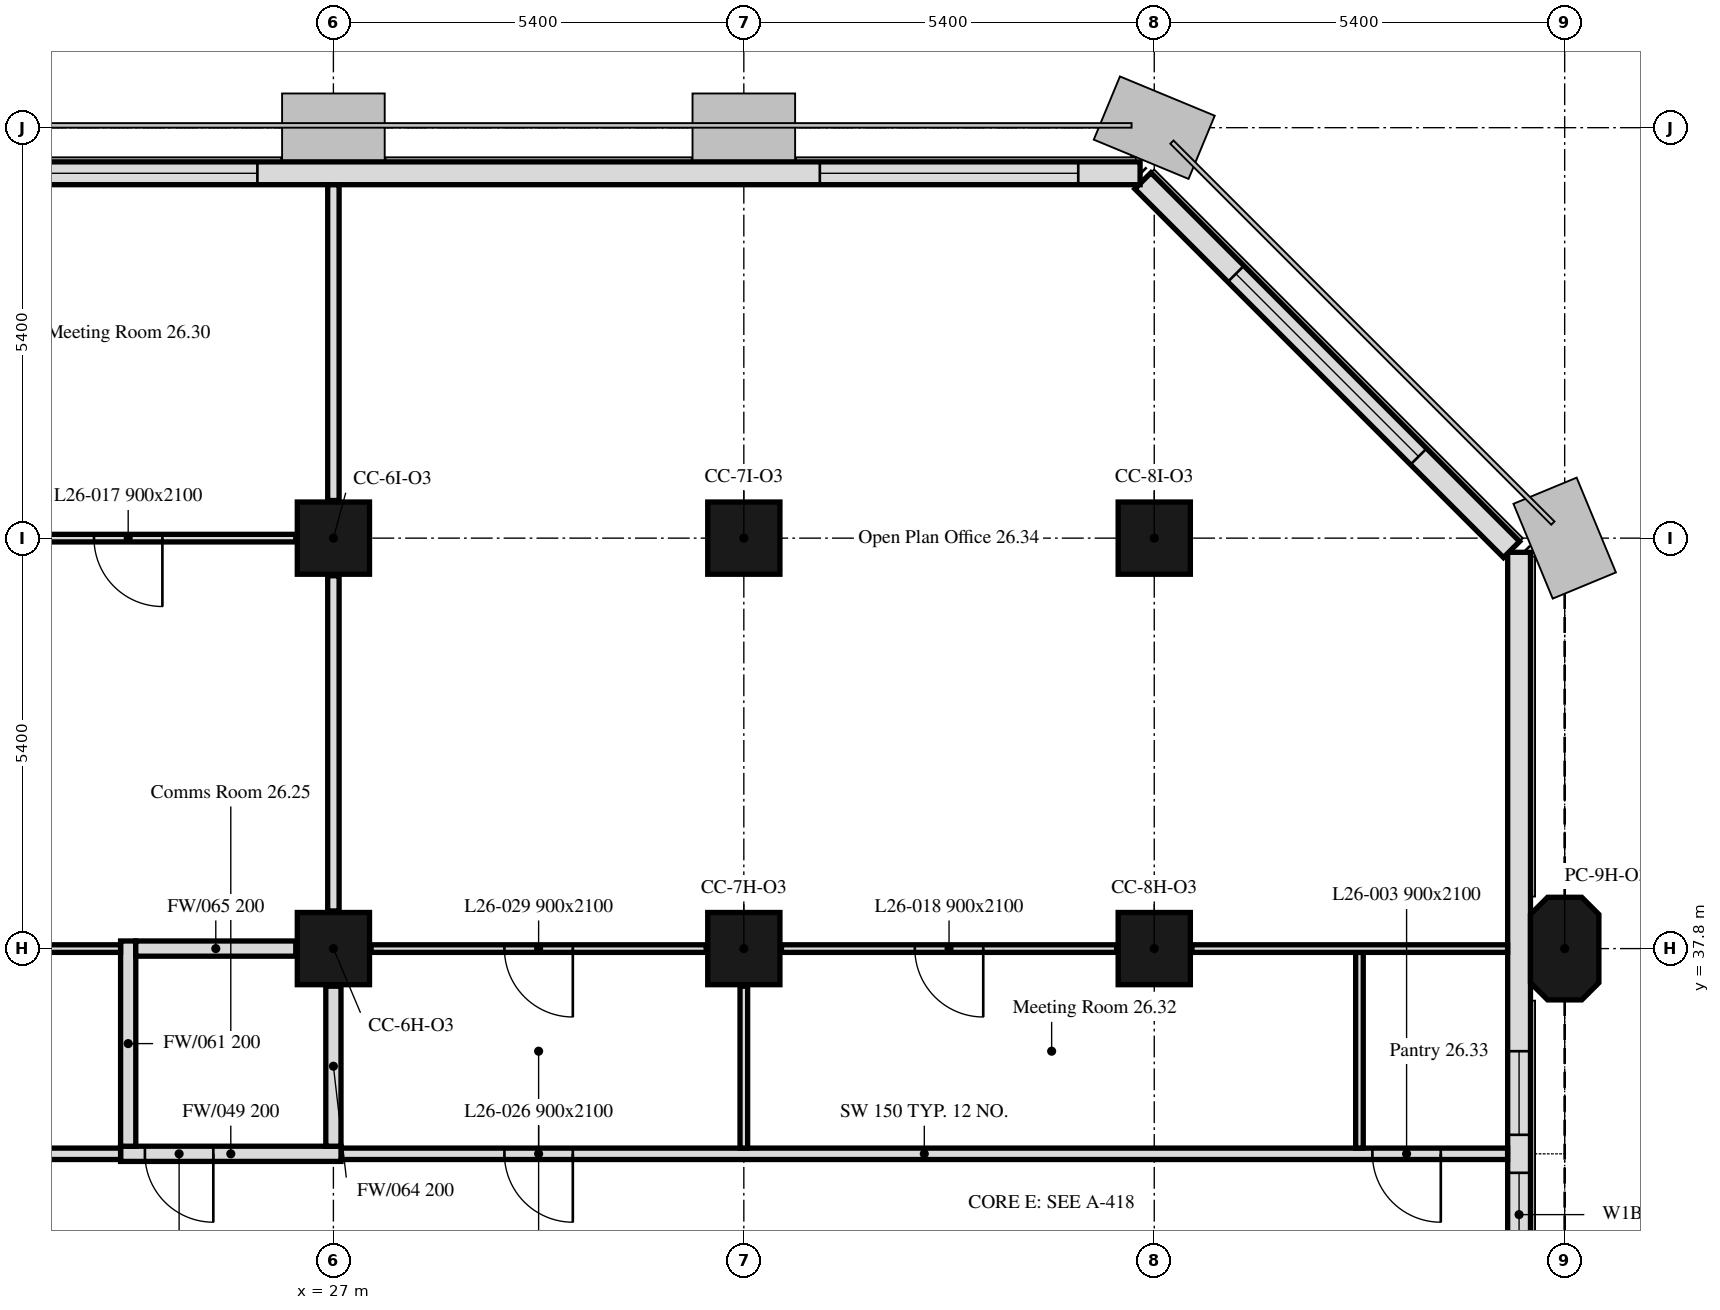
"""IFC4 building model, lengths in metres.
Left out: names, types, materials, properties, quantities, classifications, styles, units other than length and angle.
Written with IfcOpenShell. Run it as: python <this file> out.ifc"""

import sys

from ifc_helpers import new_model, si_unit, direction, frame, frame_2d, origin, origin_2d, place, context, subcontext, project, spatial, polyline, rectangle, outline, extrude, element, fill, save


model = new_model("IFC4")
c1 = context("Model", 3, precision=1e-05, world=origin(), true_north=direction((0.0, 1.0)))
c2 = subcontext(c1, "Body", "Model", "MODEL_VIEW")
j1 = project(units=[si_unit("LENGTHUNIT", "METRE"), si_unit("PLANEANGLEUNIT", "RADIAN")], contexts=[c1])
p1 = place(None, origin())
s1 = spatial("IfcSite", under=j1, at=p1, CompositionType="ELEMENT")
p2 = place(p1, origin())
s2 = spatial("IfcBuilding", under=s1, at=p2, CompositionType="ELEMENT")
p3 = place(p2, frame((0.0, 0.0, 110.6)))
s3 = spatial("IfcBuildingStorey", under=s2, at=p3, CompositionType="ELEMENT", Elevation=110.6)
for number, where, z_axis, x_axis in (
    (1, (27.0, 37.8, 0.0), (0.0, 0.0, 1.0), (1.0, 0.0, 0.0)),
    (2, (32.4, 37.8, 0.0), (0.0, 0.0, 1.0), (1.0, 0.0, 0.0)),
    (3, (37.8, 37.8, 0.0), (0.0, 0.0, 1.0), (1.0, 0.0, 0.0)),
):
    element("IfcColumn", number, at=place(p3, frame(where, z_axis=z_axis, x_axis=x_axis)), inside=s3, PredefinedType="COLUMN", context=c2, shape_type="SweptSolid", body=[
        extrude(rectangle(XDim=0.95, YDim=0.95, at=origin_2d()), origin(), (0.0, 0.0, 1.0), 3.5),
    ])
p4 = place(p3, frame((43.2, 37.8, 0.0), z_axis=(0.0, 0.0, 1.0), x_axis=(0.0, 1.0, 0.0)))
e4 = element("IfcColumn", 4, at=p4, inside=s3, PredefinedType="COLUMN", context=c2, shape_type="SweptSolid", body=[
    extrude(outline(polyline([(-0.45, -0.45), (0.45, -0.45), (0.675, -0.225), (0.675, 0.225), (0.45, 0.45), (-0.45, 0.45), (-0.675, 0.225), (-0.675, -0.225), (-0.45, -0.45)])), origin(), (0.0, 0.0, 1.0), 3.5),
])
for number, where, z_axis, x_axis in (
    (5, (27.0, 43.2, 0.0), (0.0, 0.0, 1.0), (1.0, 0.0, 0.0)),
    (6, (32.4, 43.2, 0.0), (0.0, 0.0, 1.0), (1.0, 0.0, 0.0)),
    (7, (37.8, 43.2, 0.0), (0.0, 0.0, 1.0), (1.0, 0.0, 0.0)),
):
    element("IfcColumn", number, at=place(p3, frame(where, z_axis=z_axis, x_axis=x_axis)), inside=s3, PredefinedType="COLUMN", context=c2, shape_type="SweptSolid", body=[
        extrude(rectangle(XDim=0.95, YDim=0.95, at=origin_2d()), origin(), (0.0, 0.0, 1.0), 3.5),
    ])
p5 = place(p3, frame((42.6, 32.4, 0.0), z_axis=(0.0, 0.0, 1.0), x_axis=(0.0, 1.0, 0.0)))
e8 = element("IfcWall", 8, at=p5, inside=s3, PredefinedType="SOLIDWALL", context=c2, shape_type="SweptSolid", body=[
    extrude(rectangle(XDim=10.614, YDim=0.3, at=frame_2d((5.307, 0.0))), origin(), (0.0, 0.0, 1.0), 3.5),
])
p6 = place(p5, frame((1.35, 0.0, 0.9)))
e9 = element("IfcOpeningElement", 9, at=p6, cuts=e8, PredefinedType="OPENING", context=c2, shape_type="SweptSolid", body=[
    extrude(rectangle(XDim=1.1, YDim=1.7, at=frame_2d((0.55, 0.85))), frame((0.0, 0.16, 0.0), z_axis=(0.0, -1.0, 0.0), x_axis=(1.0, 0.0, 0.0)), (0.0, 0.0, 1.0), 0.32),
])
p7 = place(p5, frame((2.95, 0.0, 0.9)))
e10 = element("IfcOpeningElement", 10, at=p7, cuts=e8, PredefinedType="OPENING", context=c2, shape_type="SweptSolid", body=[
    extrude(rectangle(XDim=1.1, YDim=1.7, at=frame_2d((0.55, 0.85))), frame((0.0, 0.16, 0.0), z_axis=(0.0, -1.0, 0.0), x_axis=(1.0, 0.0, 0.0)), (0.0, 0.0, 1.0), 0.32),
])
p8 = place(p3, frame((42.501, 43.051, 0.0), z_axis=(0.0, 0.0, 1.0), x_axis=(-0.707106781187, 0.707106781187, 0.0)))
e11 = element("IfcWall", 11, at=p8, inside=s3, PredefinedType="SOLIDWALL", context=c2, shape_type="SweptSolid", body=[
    extrude(rectangle(XDim=6.86, YDim=0.3, at=frame_2d((3.43, 0.0))), origin(), (0.0, 0.0, 1.0), 3.5),
])
p9 = place(p8, frame((1.73, 0.0, 0.9)))
e12 = element("IfcOpeningElement", 12, at=p9, cuts=e11, PredefinedType="OPENING", context=c2, shape_type="SweptSolid", body=[
    extrude(rectangle(XDim=3.4, YDim=1.7, at=frame_2d((1.7, 0.85))), frame((0.0, 0.16, 0.0), z_axis=(0.0, -1.0, 0.0), x_axis=(1.0, 0.0, 0.0)), (0.0, 0.0, 1.0), 0.32),
])
p10 = place(p3, frame((37.614, 48.0, 0.0), z_axis=(0.0, 0.0, 1.0), x_axis=(-1.0, 0.0, 0.0)))
e13 = element("IfcWall", 13, at=p10, inside=s3, PredefinedType="SOLIDWALL", context=c2, shape_type="SweptSolid", body=[
    extrude(rectangle(XDim=32.027, YDim=0.3, at=frame_2d((16.014, 0.0))), origin(), (0.0, 0.0, 1.0), 3.5),
])
p11 = place(p10, frame((0.814, 0.0, 0.9)))
e14 = element("IfcOpeningElement", 14, at=p11, cuts=e13, PredefinedType="OPENING", context=c2, shape_type="SweptSolid", body=[
    extrude(rectangle(XDim=3.4, YDim=1.7, at=frame_2d((1.7, 0.85))), frame((0.0, 0.16, 0.0), z_axis=(0.0, -1.0, 0.0), x_axis=(1.0, 0.0, 0.0)), (0.0, 0.0, 1.0), 0.32),
])
p12 = place(p10, frame((11.614, 0.0, 0.9)))
e15 = element("IfcOpeningElement", 15, at=p12, cuts=e13, PredefinedType="OPENING", context=c2, shape_type="SweptSolid", body=[
    extrude(rectangle(XDim=3.4, YDim=1.7, at=frame_2d((1.7, 0.85))), frame((0.0, 0.16, 0.0), z_axis=(0.0, -1.0, 0.0), x_axis=(1.0, 0.0, 0.0)), (0.0, 0.0, 1.0), 0.32),
])
p13 = place(p10, frame((22.414, 0.0, 0.9)))
e16 = element("IfcOpeningElement", 16, at=p13, cuts=e13, PredefinedType="OPENING", context=c2, shape_type="SweptSolid", body=[
    extrude(rectangle(XDim=3.4, YDim=1.7, at=frame_2d((1.7, 0.85))), frame((0.0, 0.16, 0.0), z_axis=(0.0, -1.0, 0.0), x_axis=(1.0, 0.0, 0.0)), (0.0, 0.0, 1.0), 0.32),
])
p14 = place(p3, frame((42.449, 35.1, 0.0), z_axis=(0.0, 0.0, 1.0), x_axis=(-1.0, 0.0, 0.0)))
e17 = element("IfcWall", 17, at=p14, inside=s3, PredefinedType="PARTITIONING", context=c2, shape_type="SweptSolid", body=[
    extrude(rectangle(XDim=15.349, YDim=0.15, at=frame_2d((7.674, 0.0))), origin(), (0.0, 0.0, 1.0), 2.75),
])
p15 = place(p14, frame((0.879, 0.0, 0.0)))
e18 = element("IfcOpeningElement", 18, at=p15, cuts=e17, PredefinedType="OPENING", context=c2, shape_type="SweptSolid", body=[
    extrude(rectangle(XDim=0.9, YDim=2.1, at=frame_2d((0.45, 1.05))), frame((0.0, 0.075, 0.0), z_axis=(0.0, -1.0, 0.0), x_axis=(1.0, 0.0, 0.0)), (0.0, 0.0, 1.0), 0.15),
])
p16 = place(p14, frame((12.299, 0.0, 0.0)))
e19 = element("IfcOpeningElement", 19, at=p16, cuts=e17, PredefinedType="OPENING", context=c2, shape_type="SweptSolid", body=[
    extrude(rectangle(XDim=0.9, YDim=2.1, at=frame_2d((0.45, 1.05))), frame((0.0, 0.075, 0.0), z_axis=(0.0, -1.0, 0.0), x_axis=(1.0, 0.0, 0.0)), (0.0, 0.0, 1.0), 0.15),
])
p17 = place(p3, frame((27.1, 35.1, 0.0), z_axis=(0.0, 0.0, 1.0), x_axis=(-1.0, 0.0, 0.0)))
e20 = element("IfcWall", 20, at=p17, inside=s3, PredefinedType="PARTITIONING", context=c2, shape_type="SweptSolid", body=[
    extrude(rectangle(XDim=2.9, YDim=0.2, at=frame_2d((1.45, 0.0))), origin(), (0.0, 0.0, 1.0), 2.75),
])
p18 = place(p17, frame((1.68, 0.0, 0.0)))
e21 = element("IfcOpeningElement", 21, at=p18, cuts=e20, PredefinedType="OPENING", context=c2, shape_type="SweptSolid", body=[
    extrude(rectangle(XDim=0.9, YDim=2.1, at=frame_2d((0.45, 1.05))), frame((0.0, 0.1, 0.0), z_axis=(0.0, -1.0, 0.0), x_axis=(1.0, 0.0, 0.0)), (0.0, 0.0, 1.0), 0.2),
])
p19 = place(p3, frame((24.2, 35.1, 0.0), z_axis=(0.0, 0.0, 1.0), x_axis=(-1.0, 0.0, 0.0)))
e22 = element("IfcWall", 22, at=p19, inside=s3, PredefinedType="PARTITIONING", context=c2, shape_type="SweptSolid", body=[
    extrude(rectangle(XDim=23.449, YDim=0.15, at=frame_2d((11.725, 0.0))), origin(), (0.0, 0.0, 1.0), 2.75),
])
p20 = place(p19, frame((16.27, 0.0, 0.0)))
e23 = element("IfcOpeningElement", 23, at=p20, cuts=e22, PredefinedType="OPENING", context=c2, shape_type="SweptSolid", body=[
    extrude(rectangle(XDim=0.9, YDim=2.1, at=frame_2d((0.45, 1.05))), frame((0.0, 0.075, 0.0), z_axis=(0.0, -1.0, 0.0), x_axis=(1.0, 0.0, 0.0)), (0.0, 0.0, 1.0), 0.15),
])
p21 = place(p19, frame((20.375, 0.0, 0.0)))
e24 = element("IfcOpeningElement", 24, at=p21, cuts=e22, PredefinedType="OPENING", context=c2, shape_type="SweptSolid", body=[
    extrude(rectangle(XDim=0.9, YDim=2.1, at=frame_2d((0.45, 1.05))), frame((0.0, 0.075, 0.0), z_axis=(0.0, -1.0, 0.0), x_axis=(1.0, 0.0, 0.0)), (0.0, 0.0, 1.0), 0.15),
])
p22 = place(p3, frame((24.3, 35.2, 0.0), z_axis=(0.0, 0.0, 1.0), x_axis=(0.0, 1.0, 0.0)))
e25 = element("IfcWall", 25, at=p22, inside=s3, PredefinedType="PARTITIONING", context=c2, shape_type="SweptSolid", body=[
    extrude(rectangle(XDim=2.7, YDim=0.2, at=frame_2d((1.35, 0.0))), origin(), (0.0, 0.0, 1.0), 3.5),
])
p23 = place(p3, frame((24.2, 37.8, 0.0), z_axis=(0.0, 0.0, 1.0), x_axis=(-1.0, 0.0, 0.0)))
e26 = element("IfcWall", 26, at=p23, inside=s3, PredefinedType="PARTITIONING", context=c2, shape_type="SweptSolid", body=[
    extrude(rectangle(XDim=2.105, YDim=0.1, at=frame_2d((1.052, 0.0))), origin(), (0.0, 0.0, 1.0), 3.5),
])
p24 = place(p3, frame((27.0, 35.2, 0.0), z_axis=(0.0, 0.0, 1.0), x_axis=(0.0, 1.0, 0.0)))
e27 = element("IfcWall", 27, at=p24, inside=s3, PredefinedType="PARTITIONING", context=c2, shape_type="SweptSolid", body=[
    extrude(rectangle(XDim=2.105, YDim=0.2, at=frame_2d((1.052, 0.0))), origin(), (0.0, 0.0, 1.0), 2.75),
])
p25 = place(p3, frame((26.505, 37.8, 0.0), z_axis=(0.0, 0.0, 1.0), x_axis=(-1.0, 0.0, 0.0)))
e28 = element("IfcWall", 28, at=p25, inside=s3, PredefinedType="PARTITIONING", context=c2, shape_type="SweptSolid", body=[
    extrude(rectangle(XDim=2.105, YDim=0.2, at=frame_2d((1.052, 0.0))), origin(), (0.0, 0.0, 1.0), 3.5),
])
p26 = place(p3, frame((26.505, 43.2, 0.0), z_axis=(0.0, 0.0, 1.0), x_axis=(-1.0, 0.0, 0.0)))
e29 = element("IfcWall", 29, at=p26, inside=s3, PredefinedType="PARTITIONING", context=c2, shape_type="SweptSolid", body=[
    extrude(rectangle(XDim=4.41, YDim=0.1, at=frame_2d((2.205, 0.0))), origin(), (0.0, 0.0, 1.0), 3.5),
])
p27 = place(p26, frame((1.755, 0.0, 0.0)))
e30 = element("IfcOpeningElement", 30, at=p27, cuts=e29, PredefinedType="OPENING", context=c2, shape_type="SweptSolid", body=[
    extrude(rectangle(XDim=0.9, YDim=2.1, at=frame_2d((0.45, 1.05))), frame((0.0, 0.05, 0.0), z_axis=(0.0, -1.0, 0.0), x_axis=(1.0, 0.0, 0.0)), (0.0, 0.0, 1.0), 0.1),
])
p28 = place(p3, frame((27.0, 38.295, 0.0), z_axis=(0.0, 0.0, 1.0), x_axis=(0.0, 1.0, 0.0)))
e31 = element("IfcWall", 31, at=p28, inside=s3, PredefinedType="PARTITIONING", context=c2, shape_type="SweptSolid", body=[
    extrude(rectangle(XDim=4.41, YDim=0.15, at=frame_2d((2.205, 0.0))), origin(), (0.0, 0.0, 1.0), 2.75),
])
p29 = place(p3, frame((27.0, 43.695, 0.0), z_axis=(0.0, 0.0, 1.0), x_axis=(0.0, 1.0, 0.0)))
e32 = element("IfcWall", 32, at=p29, inside=s3, PredefinedType="PARTITIONING", context=c2, shape_type="SweptSolid", body=[
    extrude(rectangle(XDim=4.154, YDim=0.15, at=frame_2d((2.077, 0.0))), origin(), (0.0, 0.0, 1.0), 2.75),
])
p30 = place(p3, frame((32.4, 35.175, 0.0), z_axis=(0.0, 0.0, 1.0), x_axis=(0.0, 1.0, 0.0)))
e33 = element("IfcWall", 33, at=p30, inside=s3, PredefinedType="PARTITIONING", context=c2, shape_type="SweptSolid", body=[
    extrude(rectangle(XDim=2.13, YDim=0.1, at=frame_2d((1.065, 0.0))), origin(), (0.0, 0.0, 1.0), 2.75),
])
p31 = place(p3, frame((31.905, 37.8, 0.0), z_axis=(0.0, 0.0, 1.0), x_axis=(-1.0, 0.0, 0.0)))
e34 = element("IfcWall", 34, at=p31, inside=s3, PredefinedType="PARTITIONING", context=c2, shape_type="SweptSolid", body=[
    extrude(rectangle(XDim=4.41, YDim=0.1, at=frame_2d((2.205, 0.0))), origin(), (0.0, 0.0, 1.0), 3.5),
])
p32 = place(p31, frame((1.755, 0.0, 0.0)))
e35 = element("IfcOpeningElement", 35, at=p32, cuts=e34, PredefinedType="OPENING", context=c2, shape_type="SweptSolid", body=[
    extrude(rectangle(XDim=0.9, YDim=2.1, at=frame_2d((0.45, 1.05))), frame((0.0, 0.05, 0.0), z_axis=(0.0, -1.0, 0.0), x_axis=(1.0, 0.0, 0.0)), (0.0, 0.0, 1.0), 0.1),
])
p33 = place(p3, frame((40.5, 35.175, 0.0), z_axis=(0.0, 0.0, 1.0), x_axis=(0.0, 1.0, 0.0)))
e36 = element("IfcWall", 36, at=p33, inside=s3, PredefinedType="PARTITIONING", context=c2, shape_type="SweptSolid", body=[
    extrude(rectangle(XDim=2.575, YDim=0.1, at=frame_2d((1.288, 0.0))), origin(), (0.0, 0.0, 1.0), 3.5),
])
p34 = place(p3, frame((37.305, 37.8, 0.0), z_axis=(0.0, 0.0, 1.0), x_axis=(-1.0, 0.0, 0.0)))
e37 = element("IfcWall", 37, at=p34, inside=s3, PredefinedType="PARTITIONING", context=c2, shape_type="SweptSolid", body=[
    extrude(rectangle(XDim=4.41, YDim=0.1, at=frame_2d((2.205, 0.0))), origin(), (0.0, 0.0, 1.0), 3.5),
])
p35 = place(p34, frame((1.755, 0.0, 0.0)))
e38 = element("IfcOpeningElement", 38, at=p35, cuts=e37, PredefinedType="OPENING", context=c2, shape_type="SweptSolid", body=[
    extrude(rectangle(XDim=0.9, YDim=2.1, at=frame_2d((0.45, 1.05))), frame((0.0, 0.05, 0.0), z_axis=(0.0, -1.0, 0.0), x_axis=(1.0, 0.0, 0.0)), (0.0, 0.0, 1.0), 0.1),
])
p36 = place(p3, frame((42.449, 37.8, 0.0), z_axis=(0.0, 0.0, 1.0), x_axis=(-1.0, 0.0, 0.0)))
e39 = element("IfcWall", 39, at=p36, inside=s3, PredefinedType="PARTITIONING", context=c2, shape_type="SweptSolid", body=[
    extrude(rectangle(XDim=4.154, YDim=0.1, at=frame_2d((2.077, 0.0))), origin(), (0.0, 0.0, 1.0), 3.5),
])
p37 = place(p6, origin())
e40 = element("IfcWindow", 40, at=p37, inside=s3, PartitioningType="SINGLE_PANEL", PredefinedType="WINDOW", context=c2, shape_type="SweptSolid", body=[
    extrude(rectangle(XDim=1.1, YDim=1.7, at=frame_2d((0.55, 0.85))), frame((0.0, 0.03, 0.0), z_axis=(0.0, -1.0, 0.0), x_axis=(1.0, 0.0, 0.0)), (0.0, 0.0, 1.0), 0.06),
])
fill(e9, e40)
p38 = place(p7, origin())
e41 = element("IfcWindow", 41, at=p38, inside=s3, PartitioningType="SINGLE_PANEL", PredefinedType="WINDOW", context=c2, shape_type="SweptSolid", body=[
    extrude(rectangle(XDim=1.1, YDim=1.7, at=frame_2d((0.55, 0.85))), frame((0.0, 0.03, 0.0), z_axis=(0.0, -1.0, 0.0), x_axis=(1.0, 0.0, 0.0)), (0.0, 0.0, 1.0), 0.06),
])
fill(e10, e41)
p39 = place(p9, origin())
e42 = element("IfcWindow", 42, at=p39, inside=s3, PartitioningType="SINGLE_PANEL", PredefinedType="WINDOW", context=c2, shape_type="SweptSolid", body=[
    extrude(rectangle(XDim=3.4, YDim=1.7, at=frame_2d((1.7, 0.85))), frame((0.0, 0.03, 0.0), z_axis=(0.0, -1.0, 0.0), x_axis=(1.0, 0.0, 0.0)), (0.0, 0.0, 1.0), 0.06),
])
fill(e12, e42)
p40 = place(p11, origin())
e43 = element("IfcWindow", 43, at=p40, inside=s3, PartitioningType="SINGLE_PANEL", PredefinedType="WINDOW", context=c2, shape_type="SweptSolid", body=[
    extrude(rectangle(XDim=3.4, YDim=1.7, at=frame_2d((1.7, 0.85))), frame((0.0, 0.03, 0.0), z_axis=(0.0, -1.0, 0.0), x_axis=(1.0, 0.0, 0.0)), (0.0, 0.0, 1.0), 0.06),
])
fill(e14, e43)
p41 = place(p12, origin())
e44 = element("IfcWindow", 44, at=p41, inside=s3, PartitioningType="SINGLE_PANEL", PredefinedType="WINDOW", context=c2, shape_type="SweptSolid", body=[
    extrude(rectangle(XDim=3.4, YDim=1.7, at=frame_2d((1.7, 0.85))), frame((0.0, 0.03, 0.0), z_axis=(0.0, -1.0, 0.0), x_axis=(1.0, 0.0, 0.0)), (0.0, 0.0, 1.0), 0.06),
])
fill(e15, e44)
p42 = place(p18, origin())
e45 = element("IfcDoor", 45, at=p42, inside=s3, OperationType="SINGLE_SWING_RIGHT", PredefinedType="DOOR", context=c2, shape_type="SweptSolid", body=[
    extrude(rectangle(XDim=0.9, YDim=2.1, at=frame_2d((0.45, 1.05))), frame((0.0, 0.025, 0.0), z_axis=(0.0, -1.0, 0.0), x_axis=(1.0, 0.0, 0.0)), (0.0, 0.0, 1.0), 0.05),
])
fill(e21, e45)
p43 = place(p15, origin())
e46 = element("IfcDoor", 46, at=p43, inside=s3, OperationType="SINGLE_SWING_LEFT", PredefinedType="DOOR", context=c2, shape_type="SweptSolid", body=[
    extrude(rectangle(XDim=0.9, YDim=2.1, at=frame_2d((0.45, 1.05))), frame((0.0, 0.025, 0.0), z_axis=(0.0, -1.0, 0.0), x_axis=(1.0, 0.0, 0.0)), (0.0, 0.0, 1.0), 0.05),
])
fill(e18, e46)
p44 = place(p27, origin())
e47 = element("IfcDoor", 47, at=p44, inside=s3, OperationType="SINGLE_SWING_LEFT", PredefinedType="DOOR", context=c2, shape_type="SweptSolid", body=[
    extrude(rectangle(XDim=0.9, YDim=2.1, at=frame_2d((0.45, 1.05))), frame((0.0, 0.025, 0.0), z_axis=(0.0, -1.0, 0.0), x_axis=(1.0, 0.0, 0.0)), (0.0, 0.0, 1.0), 0.05),
])
fill(e30, e47)
p45 = place(p35, origin())
e48 = element("IfcDoor", 48, at=p45, inside=s3, OperationType="SINGLE_SWING_RIGHT", PredefinedType="DOOR", context=c2, shape_type="SweptSolid", body=[
    extrude(rectangle(XDim=0.9, YDim=2.1, at=frame_2d((0.45, 1.05))), frame((0.0, 0.025, 0.0), z_axis=(0.0, -1.0, 0.0), x_axis=(1.0, 0.0, 0.0)), (0.0, 0.0, 1.0), 0.05),
])
fill(e38, e48)
p46 = place(p16, origin())
e49 = element("IfcDoor", 49, at=p46, inside=s3, OperationType="SINGLE_SWING_LEFT", PredefinedType="DOOR", context=c2, shape_type="SweptSolid", body=[
    extrude(rectangle(XDim=0.9, YDim=2.1, at=frame_2d((0.45, 1.05))), frame((0.0, 0.025, 0.0), z_axis=(0.0, -1.0, 0.0), x_axis=(1.0, 0.0, 0.0)), (0.0, 0.0, 1.0), 0.05),
])
fill(e19, e49)
p47 = place(p32, origin())
e50 = element("IfcDoor", 50, at=p47, inside=s3, OperationType="SINGLE_SWING_LEFT", PredefinedType="DOOR", context=c2, shape_type="SweptSolid", body=[
    extrude(rectangle(XDim=0.9, YDim=2.1, at=frame_2d((0.45, 1.05))), frame((0.0, 0.025, 0.0), z_axis=(0.0, -1.0, 0.0), x_axis=(1.0, 0.0, 0.0)), (0.0, 0.0, 1.0), 0.05),
])
fill(e35, e50)
save(model, sys.argv[1])
